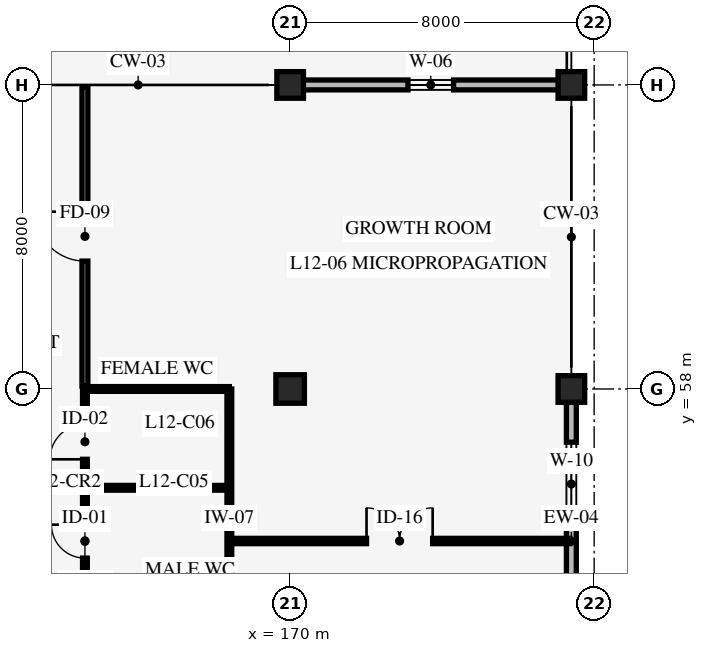
"""IFC4 building model, lengths in metres.
Left out: names, types, materials, properties, quantities, classifications, styles, units other than length and angle.
Written with IfcOpenShell. Run it as: python <this file> out.ifc"""

import sys

from ifc_helpers import new_model, si_unit, direction, frame, frame_2d, origin, origin_2d, place, context, subcontext, project, spatial, rectangle, extrude, element, fill, save


model = new_model("IFC4")
c1 = context("Model", 3, precision=1e-05, world=origin(), true_north=direction((0.0, 1.0)))
c2 = subcontext(c1, "Body", "Model", "MODEL_VIEW")
j1 = project(units=[si_unit("LENGTHUNIT", "METRE"), si_unit("PLANEANGLEUNIT", "RADIAN")], contexts=[c1])
p1 = place(None, origin())
s1 = spatial("IfcSite", under=j1, at=p1, CompositionType="ELEMENT")
p2 = place(p1, origin())
s2 = spatial("IfcBuilding", under=s1, at=p2, CompositionType="ELEMENT")
p3 = place(p2, frame((0.0, 0.0, 48.6)))
s3 = spatial("IfcBuildingStorey", under=s2, at=p3, CompositionType="ELEMENT", Elevation=48.6)
p4 = place(p3, frame((170.0, 58.0, 0.0), z_axis=(0.0, 0.0, 1.0), x_axis=(1.0, 0.0, 0.0)))
e1 = element("IfcColumn", 1, at=p4, inside=s3, PredefinedType="COLUMN", context=c2, shape_type="SweptSolid", body=[
    extrude(rectangle(XDim=0.75, YDim=0.75, at=origin_2d()), origin(), (0.0, 0.0, 1.0), 4.2),
])
for number, where, z_axis, x_axis in (
    (2, (170.0, 66.0, 0.0), (0.0, 0.0, 1.0), (1.0, 0.0, 0.0)),
    (3, (177.4, 58.0, 0.0), (0.0, 0.0, 1.0), (1.0, 0.0, 0.0)),
    (4, (177.4, 66.0, 0.0), (0.0, 0.0, 1.0), (1.0, 0.0, 0.0)),
):
    element("IfcColumn", number, at=place(p3, frame(where, z_axis=z_axis, x_axis=x_axis)), inside=s3, PredefinedType="COLUMN", context=c2, shape_type="SweptSolid", body=[
        extrude(rectangle(XDim=0.7, YDim=0.7, at=origin_2d()), origin(), (0.0, 0.0, 1.0), 4.2),
    ])
p5 = place(p3, frame((170.0, 66.0, 0.0), z_axis=(0.0, 0.0, 1.0), x_axis=(1.0, 0.0, 0.0)))
e5 = element("IfcWall", 5, at=p5, inside=s3, PredefinedType="STANDARD", context=c2, shape_type="SweptSolid", body=[
    extrude(rectangle(XDim=7.4, YDim=0.26, at=frame_2d((3.7, 0.0))), origin(), (0.0, 0.0, 1.0), 3.19),
])
p6 = place(p5, frame((3.1, 0.0, 0.85)))
e6 = element("IfcOpeningElement", 6, at=p6, cuts=e5, PredefinedType="OPENING", context=c2, shape_type="SweptSolid", body=[
    extrude(rectangle(XDim=1.2, YDim=1.2, at=frame_2d((0.6, 0.6))), frame((0.0, 0.14, 0.0), z_axis=(0.0, -1.0, 0.0), x_axis=(1.0, 0.0, 0.0)), (0.0, 0.0, 1.0), 0.28),
])
p7 = place(p3, frame((177.4, 58.0, 0.0), z_axis=(0.0, 0.0, 1.0), x_axis=(0.0, -1.0, 0.0)))
e7 = element("IfcWall", 7, at=p7, inside=s3, PredefinedType="STANDARD", context=c2, shape_type="SweptSolid", body=[
    extrude(rectangle(XDim=8.0, YDim=0.26, at=frame_2d((4.0, 0.0))), origin(), (0.0, 0.0, 1.0), 3.24),
])
p8 = place(p7, frame((1.4, 0.0, 0.85)))
e8 = element("IfcOpeningElement", 8, at=p8, cuts=e7, PredefinedType="OPENING", context=c2, shape_type="SweptSolid", body=[
    extrude(rectangle(XDim=2.2, YDim=1.4, at=frame_2d((1.1, 0.7))), frame((0.0, 0.14, 0.0), z_axis=(0.0, -1.0, 0.0), x_axis=(1.0, 0.0, 0.0)), (0.0, 0.0, 1.0), 0.28),
])
p9 = place(p3, frame((164.6, 50.0, 0.0), z_axis=(0.0, 0.0, 1.0), x_axis=(0.0, 1.0, 0.0)))
e9 = element("IfcWall", 9, at=p9, inside=s3, PredefinedType="STANDARD", context=c2, shape_type="SweptSolid", body=[
    extrude(rectangle(XDim=8.0, YDim=0.125, at=frame_2d((4.0, 0.0))), origin(), (0.0, 0.0, 1.0), 3.9),
])
p10 = place(p9, frame((0.9, 0.0, 0.0)))
e10 = element("IfcOpeningElement", 10, at=p10, cuts=e9, PredefinedType="OPENING", context=c2, shape_type="SweptSolid", body=[
    extrude(rectangle(XDim=0.96, YDim=2.08, at=frame_2d((0.48, 1.04))), frame((0.0, 0.073, 0.0), z_axis=(0.0, -1.0, 0.0), x_axis=(1.0, 0.0, 0.0)), (0.0, 0.0, 1.0), 0.145),
])
p11 = place(p9, frame((3.55, 0.0, 0.0)))
e11 = element("IfcOpeningElement", 11, at=p11, cuts=e9, PredefinedType="OPENING", context=c2, shape_type="SweptSolid", body=[
    extrude(rectangle(XDim=0.88, YDim=2.05, at=frame_2d((0.44, 1.025))), frame((0.0, 0.073, 0.0), z_axis=(0.0, -1.0, 0.0), x_axis=(1.0, 0.0, 0.0)), (0.0, 0.0, 1.0), 0.145),
])
p12 = place(p9, frame((6.15, 0.0, 0.0)))
e12 = element("IfcOpeningElement", 12, at=p12, cuts=e9, PredefinedType="OPENING", context=c2, shape_type="SweptSolid", body=[
    extrude(rectangle(XDim=0.92, YDim=2.05, at=frame_2d((0.46, 1.025))), frame((0.0, 0.073, 0.0), z_axis=(0.0, -1.0, 0.0), x_axis=(1.0, 0.0, 0.0)), (0.0, 0.0, 1.0), 0.145),
])
p13 = place(p3, frame((168.4, 50.0, 0.0), z_axis=(0.0, 0.0, 1.0), x_axis=(0.0, 1.0, 0.0)))
e13 = element("IfcWall", 13, at=p13, inside=s3, PredefinedType="STANDARD", context=c2, shape_type="SweptSolid", body=[
    extrude(rectangle(XDim=8.0, YDim=0.125, at=frame_2d((4.0, 0.0))), origin(), (0.0, 0.0, 1.0), 3.9),
])
p14 = place(p3, frame((164.6, 55.4, 0.0), z_axis=(0.0, 0.0, 1.0), x_axis=(1.0, 0.0, 0.0)))
e14 = element("IfcWall", 14, at=p14, inside=s3, PredefinedType="STANDARD", context=c2, shape_type="SweptSolid", body=[
    extrude(rectangle(XDim=3.8, YDim=0.125, at=frame_2d((1.9, 0.0))), origin(), (0.0, 0.0, 1.0), 3.9),
])
p15 = place(p3, frame((164.6, 58.0, 0.0), z_axis=(0.0, 0.0, 1.0), x_axis=(1.0, 0.0, 0.0)))
e15 = element("IfcWall", 15, at=p15, inside=s3, PredefinedType="STANDARD", context=c2, shape_type="SweptSolid", body=[
    extrude(rectangle(XDim=3.8, YDim=0.125, at=frame_2d((1.9, 0.0))), origin(), (0.0, 0.0, 1.0), 3.19),
])
p16 = place(p3, frame((168.4, 54.0, 0.0), z_axis=(0.0, 0.0, 1.0), x_axis=(1.0, 0.0, 0.0)))
e16 = element("IfcWall", 16, at=p16, inside=s3, PredefinedType="STANDARD", context=c2, shape_type="SweptSolid", body=[
    extrude(rectangle(XDim=8.96, YDim=0.14, at=frame_2d((4.48, 0.0))), origin(), (0.0, 0.0, 1.0), 3.9),
])
p17 = place(p16, frame((3.61, 0.0, 0.0)))
e17 = element("IfcOpeningElement", 17, at=p17, cuts=e16, PredefinedType="OPENING", context=c2, shape_type="SweptSolid", body=[
    extrude(rectangle(XDim=1.74, YDim=2.26, at=frame_2d((0.87, 1.13))), frame((0.0, 0.08, 0.0), z_axis=(0.0, -1.0, 0.0), x_axis=(1.0, 0.0, 0.0)), (0.0, 0.0, 1.0), 0.16),
])
p18 = place(p3, frame((164.6, 58.08, 0.0), z_axis=(0.0, 0.0, 1.0), x_axis=(0.0, 1.0, 0.0)))
e18 = element("IfcWall", 18, at=p18, inside=s3, PredefinedType="STANDARD", context=c2, shape_type="SweptSolid", body=[
    extrude(rectangle(XDim=7.87, YDim=0.155, at=frame_2d((3.935, 0.0))), origin(), (0.0, 0.0, 1.0), 3.9),
])
p19 = place(p18, frame((3.285, 0.0, 0.0)))
e19 = element("IfcOpeningElement", 19, at=p19, cuts=e18, PredefinedType="OPENING", context=c2, shape_type="SweptSolid", body=[
    extrude(rectangle(XDim=1.3, YDim=2.15, at=frame_2d((0.65, 1.075))), frame((0.0, 0.087, 0.0), z_axis=(0.0, -1.0, 0.0), x_axis=(1.0, 0.0, 0.0)), (0.0, 0.0, 1.0), 0.175),
])
p20 = place(p6, origin())
e20 = element("IfcWindow", 20, at=p20, inside=s3, PartitioningType="SINGLE_PANEL", PredefinedType="WINDOW", context=c2, shape_type="SweptSolid", body=[
    extrude(rectangle(XDim=1.2, YDim=1.2, at=frame_2d((0.6, 0.6))), frame((0.0, 0.03, 0.0), z_axis=(0.0, -1.0, 0.0), x_axis=(1.0, 0.0, 0.0)), (0.0, 0.0, 1.0), 0.06),
])
fill(e6, e20)
p21 = place(p8, origin())
e21 = element("IfcWindow", 21, at=p21, inside=s3, PartitioningType="SINGLE_PANEL", PredefinedType="WINDOW", context=c2, shape_type="SweptSolid", body=[
    extrude(rectangle(XDim=2.2, YDim=1.4, at=frame_2d((1.1, 0.7))), frame((0.0, 0.03, 0.0), z_axis=(0.0, -1.0, 0.0), x_axis=(1.0, 0.0, 0.0)), (0.0, 0.0, 1.0), 0.06),
])
fill(e8, e21)
p22 = place(p11, origin())
e22 = element("IfcDoor", 22, at=p22, inside=s3, OperationType="SINGLE_SWING_RIGHT", PredefinedType="DOOR", context=c2, shape_type="SweptSolid", body=[
    extrude(rectangle(XDim=0.88, YDim=2.05, at=frame_2d((0.44, 1.025))), frame((0.0, 0.025, 0.0), z_axis=(0.0, -1.0, 0.0), x_axis=(1.0, 0.0, 0.0)), (0.0, 0.0, 1.0), 0.05),
])
fill(e11, e22)
p23 = place(p12, origin())
e23 = element("IfcDoor", 23, at=p23, inside=s3, OperationType="SINGLE_SWING_LEFT", PredefinedType="DOOR", context=c2, shape_type="SweptSolid", body=[
    extrude(rectangle(XDim=0.92, YDim=2.05, at=frame_2d((0.46, 1.025))), frame((0.0, 0.025, 0.0), z_axis=(0.0, -1.0, 0.0), x_axis=(1.0, 0.0, 0.0)), (0.0, 0.0, 1.0), 0.05),
])
fill(e12, e23)
p24 = place(p17, origin())
e24 = element("IfcDoor", 24, at=p24, inside=s3, OperationType="DOUBLE_DOOR_SINGLE_SWING", PredefinedType="DOOR", context=c2, shape_type="SweptSolid", body=[
    extrude(rectangle(XDim=1.74, YDim=2.26, at=frame_2d((0.87, 1.13))), frame((0.0, 0.025, 0.0), z_axis=(0.0, -1.0, 0.0), x_axis=(1.0, 0.0, 0.0)), (0.0, 0.0, 1.0), 0.05),
])
fill(e17, e24)
p25 = place(p19, origin())
e25 = element("IfcDoor", 25, at=p25, inside=s3, OperationType="SINGLE_SWING_RIGHT", PredefinedType="DOOR", context=c2, shape_type="SweptSolid", body=[
    extrude(rectangle(XDim=1.3, YDim=2.15, at=frame_2d((0.65, 1.075))), frame((0.0, 0.025, 0.0), z_axis=(0.0, -1.0, 0.0), x_axis=(1.0, 0.0, 0.0)), (0.0, 0.0, 1.0), 0.05),
])
fill(e19, e25)
save(model, sys.argv[1])
